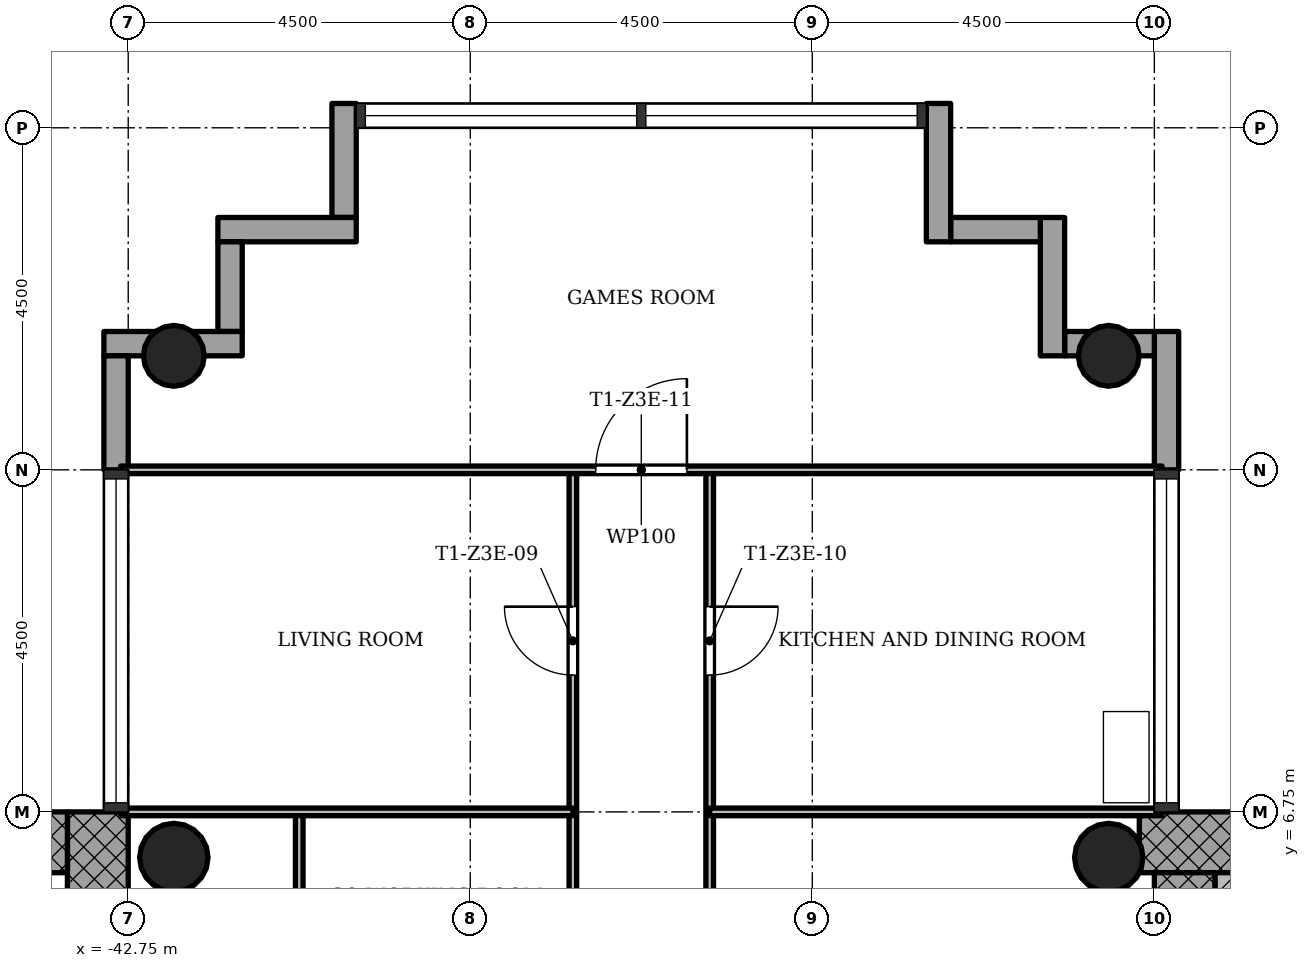
"""IFC4 building model, lengths in metres.
Left out: names, types, materials, properties, quantities, classifications, styles, units other than length and angle.
Written with IfcOpenShell. Run it as: python <this file> out.ifc"""

import sys

from ifc_helpers import new_model, si_unit, direction, frame, frame_2d, origin, origin_2d, place, context, subcontext, project, spatial, rectangle, hollow_circle, extrude, element, fill, save


model = new_model("IFC4")
c1 = context("Model", 3, precision=1e-05, world=origin(), true_north=direction((0.0, 1.0)))
c2 = subcontext(c1, "Body", "Model", "MODEL_VIEW")
j1 = project(units=[si_unit("LENGTHUNIT", "METRE"), si_unit("PLANEANGLEUNIT", "RADIAN")], contexts=[c1])
p1 = place(None, origin())
s1 = spatial("IfcSite", under=j1, at=p1, CompositionType="ELEMENT")
p2 = place(p1, origin())
s2 = spatial("IfcBuilding", under=s1, at=p2, CompositionType="ELEMENT")
p3 = place(p2, frame((0.0, 0.0, 177.9)))
s3 = spatial("IfcBuildingStorey", under=s2, at=p3, CompositionType="ELEMENT", Elevation=177.9)
p4 = place(p3, frame((-20.652, 6.35, 0.0), z_axis=(0.0, 0.0, 1.0), x_axis=(-1.0, 0.0, 0.0)))
e1 = element("IfcWall", 1, at=p4, inside=s3, PredefinedType="SHEAR", context=c2, shape_type="SweptSolid", body=[
    extrude(rectangle(XDim=8.796, YDim=0.8, at=frame_2d((4.398, 0.0))), origin(), (0.0, 0.0, 1.0), 3.4),
])
p5 = place(p3, frame((-28.85, 5.95, 0.0), z_axis=(0.0, 0.0, 1.0), x_axis=(0.0, -1.0, 0.0)))
e2 = element("IfcWall", 2, at=p5, inside=s3, PredefinedType="SHEAR", context=c2, shape_type="SweptSolid", body=[
    extrude(rectangle(XDim=12.7, YDim=0.8, at=frame_2d((6.35, 0.0))), origin(), (0.0, 0.0, 1.0), 3.4),
])
p6 = place(p5, frame((5.05, 0.0, 0.0)))
e3 = element("IfcOpeningElement", 3, at=p6, cuts=e2, PredefinedType="OPENING", context=c2, shape_type="SweptSolid", body=[
    extrude(rectangle(XDim=1.8, YDim=2.1, at=frame_2d((0.9, 1.05))), frame((0.0, 0.41, 0.0), z_axis=(0.0, -1.0, 0.0), x_axis=(1.0, 0.0, 0.0)), (0.0, 0.0, 1.0), 0.82),
])
p7 = place(p3, frame((-43.15, -5.95, 0.0), z_axis=(0.0, 0.0, 1.0), x_axis=(0.0, 1.0, 0.0)))
e4 = element("IfcWall", 4, at=p7, inside=s3, PredefinedType="SHEAR", context=c2, shape_type="SweptSolid", body=[
    extrude(rectangle(XDim=12.7, YDim=0.8, at=frame_2d((6.35, 0.0))), origin(), (0.0, 0.0, 1.0), 3.4),
])
p8 = place(p7, frame((5.05, 0.0, 0.0)))
e5 = element("IfcOpeningElement", 5, at=p8, cuts=e4, PredefinedType="OPENING", context=c2, shape_type="SweptSolid", body=[
    extrude(rectangle(XDim=1.8, YDim=2.1, at=frame_2d((0.9, 1.05))), frame((0.0, 0.41, 0.0), z_axis=(0.0, -1.0, 0.0), x_axis=(1.0, 0.0, 0.0)), (0.0, 0.0, 1.0), 0.82),
])
p9 = place(p3, frame((-43.55, 6.35, 0.0), z_axis=(0.0, 0.0, 1.0), x_axis=(-1.0, 0.0, 0.0)))
e6 = element("IfcWall", 6, at=p9, inside=s3, PredefinedType="SHEAR", context=c2, shape_type="SweptSolid", body=[
    extrude(rectangle(XDim=8.2, YDim=0.8, at=frame_2d((4.1, 0.0))), origin(), (0.0, 0.0, 1.0), 3.4),
])
for number, where, z_axis, x_axis in (
    (7, (-29.85, 12.75, 0.0), (0.0, 0.0, 1.0), (1.0, 0.0, 0.0)),
    (8, (-42.15, 12.75, 0.0), (0.0, 0.0, 1.0), (1.0, 0.0, 0.0)),
):
    element("IfcColumn", number, at=place(p3, frame(where, z_axis=z_axis, x_axis=x_axis)), inside=s3, PredefinedType="COLUMN", context=c2, shape_type="SweptSolid", body=[
        extrude(hollow_circle(Radius=0.4, WallThickness=0.028, at=origin_2d()), origin(), (0.0, 0.0, 1.0), 3.4),
    ])
for number, where, z_axis, x_axis in (
    (9, (-29.85, 6.15, 0.0), (0.0, 0.0, 1.0), (1.0, 0.0, 0.0)),
    (10, (-42.15, 6.15, 0.0), (0.0, 0.0, 1.0), (1.0, 0.0, 0.0)),
):
    element("IfcColumn", number, at=place(p3, frame(where, z_axis=z_axis, x_axis=x_axis)), inside=s3, PredefinedType="COLUMN", context=c2, shape_type="SweptSolid", body=[
        extrude(hollow_circle(Radius=0.45, WallThickness=0.032, at=origin_2d()), origin(), (0.0, 0.0, 1.0), 3.4),
    ])
p10 = place(p3, frame((-29.09, 11.25, -0.3), z_axis=(0.0, 0.0, 1.0), x_axis=(0.0, 1.0, 0.0)))
e11 = element("IfcWall", 11, at=p10, inside=s3, PredefinedType="STANDARD", context=c2, shape_type="SweptSolid", body=[
    extrude(rectangle(XDim=1.82, YDim=0.32, at=frame_2d((0.91, 0.0))), origin(), (0.0, 0.0, 1.0), 3.4),
])
p11 = place(p3, frame((-29.25, 12.91, -0.3), z_axis=(0.0, 0.0, 1.0), x_axis=(-1.0, 0.0, 0.0)))
e12 = element("IfcWall", 12, at=p11, inside=s3, PredefinedType="STANDARD", context=c2, shape_type="SweptSolid", body=[
    extrude(rectangle(XDim=1.18, YDim=0.32, at=frame_2d((0.59, 0.0))), origin(), (0.0, 0.0, 1.0), 3.4),
])
p12 = place(p3, frame((-30.59, 12.75, -0.3), z_axis=(0.0, 0.0, 1.0), x_axis=(0.0, 1.0, 0.0)))
e13 = element("IfcWall", 13, at=p12, inside=s3, PredefinedType="STANDARD", context=c2, shape_type="SweptSolid", body=[
    extrude(rectangle(XDim=1.82, YDim=0.32, at=frame_2d((0.91, 0.0))), origin(), (0.0, 0.0, 1.0), 3.4),
])
p13 = place(p3, frame((-30.75, 14.41, -0.3), z_axis=(0.0, 0.0, 1.0), x_axis=(-1.0, 0.0, 0.0)))
e14 = element("IfcWall", 14, at=p13, inside=s3, PredefinedType="STANDARD", context=c2, shape_type="SweptSolid", body=[
    extrude(rectangle(XDim=1.18, YDim=0.32, at=frame_2d((0.59, 0.0))), origin(), (0.0, 0.0, 1.0), 3.4),
])
p14 = place(p3, frame((-32.09, 14.25, -0.3), z_axis=(0.0, 0.0, 1.0), x_axis=(0.0, 1.0, 0.0)))
e15 = element("IfcWall", 15, at=p14, inside=s3, PredefinedType="STANDARD", context=c2, shape_type="SweptSolid", body=[
    extrude(rectangle(XDim=1.82, YDim=0.32, at=frame_2d((0.91, 0.0))), origin(), (0.0, 0.0, 1.0), 3.4),
])
p15 = place(p3, frame((-39.91, 16.07, -0.3), z_axis=(0.0, 0.0, 1.0), x_axis=(0.0, -1.0, 0.0)))
e16 = element("IfcWall", 16, at=p15, inside=s3, PredefinedType="STANDARD", context=c2, shape_type="SweptSolid", body=[
    extrude(rectangle(XDim=1.5, YDim=0.32, at=frame_2d((0.75, 0.0))), origin(), (0.0, 0.0, 1.0), 3.4),
])
p16 = place(p3, frame((-39.75, 14.41, -0.3), z_axis=(0.0, 0.0, 1.0), x_axis=(-1.0, 0.0, 0.0)))
e17 = element("IfcWall", 17, at=p16, inside=s3, PredefinedType="STANDARD", context=c2, shape_type="SweptSolid", body=[
    extrude(rectangle(XDim=1.82, YDim=0.32, at=frame_2d((0.91, 0.0))), origin(), (0.0, 0.0, 1.0), 3.4),
])
p17 = place(p3, frame((-41.41, 14.25, -0.3), z_axis=(0.0, 0.0, 1.0), x_axis=(0.0, -1.0, 0.0)))
e18 = element("IfcWall", 18, at=p17, inside=s3, PredefinedType="STANDARD", context=c2, shape_type="SweptSolid", body=[
    extrude(rectangle(XDim=1.18, YDim=0.32, at=frame_2d((0.59, 0.0))), origin(), (0.0, 0.0, 1.0), 3.4),
])
p18 = place(p3, frame((-41.25, 12.91, -0.3), z_axis=(0.0, 0.0, 1.0), x_axis=(-1.0, 0.0, 0.0)))
e19 = element("IfcWall", 19, at=p18, inside=s3, PredefinedType="STANDARD", context=c2, shape_type="SweptSolid", body=[
    extrude(rectangle(XDim=1.82, YDim=0.32, at=frame_2d((0.91, 0.0))), origin(), (0.0, 0.0, 1.0), 3.4),
])
p19 = place(p3, frame((-42.91, 12.75, -0.3), z_axis=(0.0, 0.0, 1.0), x_axis=(0.0, -1.0, 0.0)))
e20 = element("IfcWall", 20, at=p19, inside=s3, PredefinedType="STANDARD", context=c2, shape_type="SweptSolid", body=[
    extrude(rectangle(XDim=1.5, YDim=0.32, at=frame_2d((0.75, 0.0))), origin(), (0.0, 0.0, 1.0), 3.4),
])
p20 = place(p3, frame((-40.5, 1.5, 0.0), z_axis=(0.0, 0.0, 1.0), x_axis=(0.0, 1.0, 0.0)))
e21 = element("IfcWall", 21, at=p20, inside=s3, PredefinedType="PARTITIONING", context=c2, shape_type="SweptSolid", body=[
    extrude(rectangle(XDim=5.25, YDim=0.1, at=frame_2d((2.625, 0.0))), origin(), (0.0, 0.0, 1.0), 3.0),
])
p21 = place(p20, frame((1.05, 0.0, 0.0)))
e22 = element("IfcOpeningElement", 22, at=p21, cuts=e21, PredefinedType="OPENING", context=c2, shape_type="SweptSolid", body=[
    extrude(rectangle(XDim=0.9, YDim=2.1, at=frame_2d((0.45, 1.05))), frame((0.0, 0.06, 0.0), z_axis=(0.0, -1.0, 0.0), x_axis=(1.0, 0.0, 0.0)), (0.0, 0.0, 1.0), 0.12),
])
p22 = place(p3, frame((-36.9, 4.5, 0.0), z_axis=(0.0, 0.0, 1.0), x_axis=(0.0, 1.0, 0.0)))
e23 = element("IfcWall", 23, at=p22, inside=s3, PredefinedType="PARTITIONING", context=c2, shape_type="SweptSolid", body=[
    extrude(rectangle(XDim=6.75, YDim=0.1, at=frame_2d((3.375, 0.0))), origin(), (0.0, 0.0, 1.0), 3.0),
])
p23 = place(p22, frame((4.05, 0.0, 0.0)))
e24 = element("IfcOpeningElement", 24, at=p23, cuts=e23, PredefinedType="OPENING", context=c2, shape_type="SweptSolid", body=[
    extrude(rectangle(XDim=0.9, YDim=2.1, at=frame_2d((0.45, 1.05))), frame((0.0, 0.06, 0.0), z_axis=(0.0, -1.0, 0.0), x_axis=(1.0, 0.0, 0.0)), (0.0, 0.0, 1.0), 0.12),
])
p24 = place(p3, frame((-35.1, 4.5, 0.0), z_axis=(0.0, 0.0, 1.0), x_axis=(0.0, 1.0, 0.0)))
e25 = element("IfcWall", 25, at=p24, inside=s3, PredefinedType="PARTITIONING", context=c2, shape_type="SweptSolid", body=[
    extrude(rectangle(XDim=6.75, YDim=0.1, at=frame_2d((3.375, 0.0))), origin(), (0.0, 0.0, 1.0), 3.0),
])
p25 = place(p24, frame((4.05, 0.0, 0.0)))
e26 = element("IfcOpeningElement", 26, at=p25, cuts=e25, PredefinedType="OPENING", context=c2, shape_type="SweptSolid", body=[
    extrude(rectangle(XDim=0.9, YDim=2.1, at=frame_2d((0.45, 1.05))), frame((0.0, 0.06, 0.0), z_axis=(0.0, -1.0, 0.0), x_axis=(1.0, 0.0, 0.0)), (0.0, 0.0, 1.0), 0.12),
])
for number, where, z_axis, x_axis in (
    (27, (-42.85, 6.75, 0.0), (0.0, 0.0, 1.0), (1.0, 0.0, 0.0)),
    (28, (-35.1, 6.75, 0.0), (0.0, 0.0, 1.0), (1.0, 0.0, 0.0)),
):
    element("IfcWall", number, at=place(p3, frame(where, z_axis=z_axis, x_axis=x_axis)), inside=s3, PredefinedType="PARTITIONING", context=c2, shape_type="SweptSolid", body=[
        extrude(rectangle(XDim=5.95, YDim=0.1, at=frame_2d((2.975, 0.0))), origin(), (0.0, 0.0, 1.0), 3.0),
    ])
p26 = place(p3, frame((-42.85, 11.25, 0.0), z_axis=(0.0, 0.0, 1.0), x_axis=(1.0, 0.0, 0.0)))
e29 = element("IfcWall", 29, at=p26, inside=s3, PredefinedType="PARTITIONING", context=c2, shape_type="SweptSolid", body=[
    extrude(rectangle(XDim=13.7, YDim=0.1, at=frame_2d((6.85, 0.0))), origin(), (0.0, 0.0, 1.0), 3.0),
])
p27 = place(p26, frame((6.25, 0.0, 0.0)))
e30 = element("IfcOpeningElement", 30, at=p27, cuts=e29, PredefinedType="OPENING", context=c2, shape_type="SweptSolid", body=[
    extrude(rectangle(XDim=1.2, YDim=2.1, at=frame_2d((0.6, 1.05))), frame((0.0, 0.06, 0.0), z_axis=(0.0, -1.0, 0.0), x_axis=(1.0, 0.0, 0.0)), (0.0, 0.0, 1.0), 0.12),
])
p28 = place(p3, frame((-28.25, 1.85, 0.0), z_axis=(0.0, 0.0, 1.0), x_axis=(0.0, 1.0, 0.0)))
e31 = element("IfcWall", 31, at=p28, inside=s3, PredefinedType="SHEAR", context=c2, shape_type="SweptSolid", body=[
    extrude(rectangle(XDim=4.1, YDim=0.4, at=frame_2d((2.05, 0.0))), origin(), (0.0, 0.0, 1.0), 3.4),
])
p29 = place(p23, origin())
e32 = element("IfcDoor", 32, at=p29, inside=s3, OperationType="SINGLE_SWING_LEFT", PredefinedType="DOOR", context=c2, shape_type="SweptSolid", body=[
    extrude(rectangle(XDim=0.9, YDim=2.1, at=frame_2d((0.45, 1.05))), frame((0.0, 0.025, 0.0), z_axis=(0.0, -1.0, 0.0), x_axis=(1.0, 0.0, 0.0)), (0.0, 0.0, 1.0), 0.05),
])
fill(e24, e32)
p30 = place(p25, origin())
e33 = element("IfcDoor", 33, at=p30, inside=s3, OperationType="SINGLE_SWING_RIGHT", PredefinedType="DOOR", context=c2, shape_type="SweptSolid", body=[
    extrude(rectangle(XDim=0.9, YDim=2.1, at=frame_2d((0.45, 1.05))), frame((0.0, 0.025, 0.0), z_axis=(0.0, -1.0, 0.0), x_axis=(1.0, 0.0, 0.0)), (0.0, 0.0, 1.0), 0.05),
])
fill(e26, e33)
p31 = place(p27, origin())
e34 = element("IfcDoor", 34, at=p31, inside=s3, OperationType="SINGLE_SWING_LEFT", PredefinedType="DOOR", context=c2, shape_type="SweptSolid", body=[
    extrude(rectangle(XDim=1.2, YDim=2.1, at=frame_2d((0.6, 1.05))), frame((0.0, 0.025, 0.0), z_axis=(0.0, -1.0, 0.0), x_axis=(1.0, 0.0, 0.0)), (0.0, 0.0, 1.0), 0.05),
])
fill(e30, e34)
save(model, sys.argv[1])
